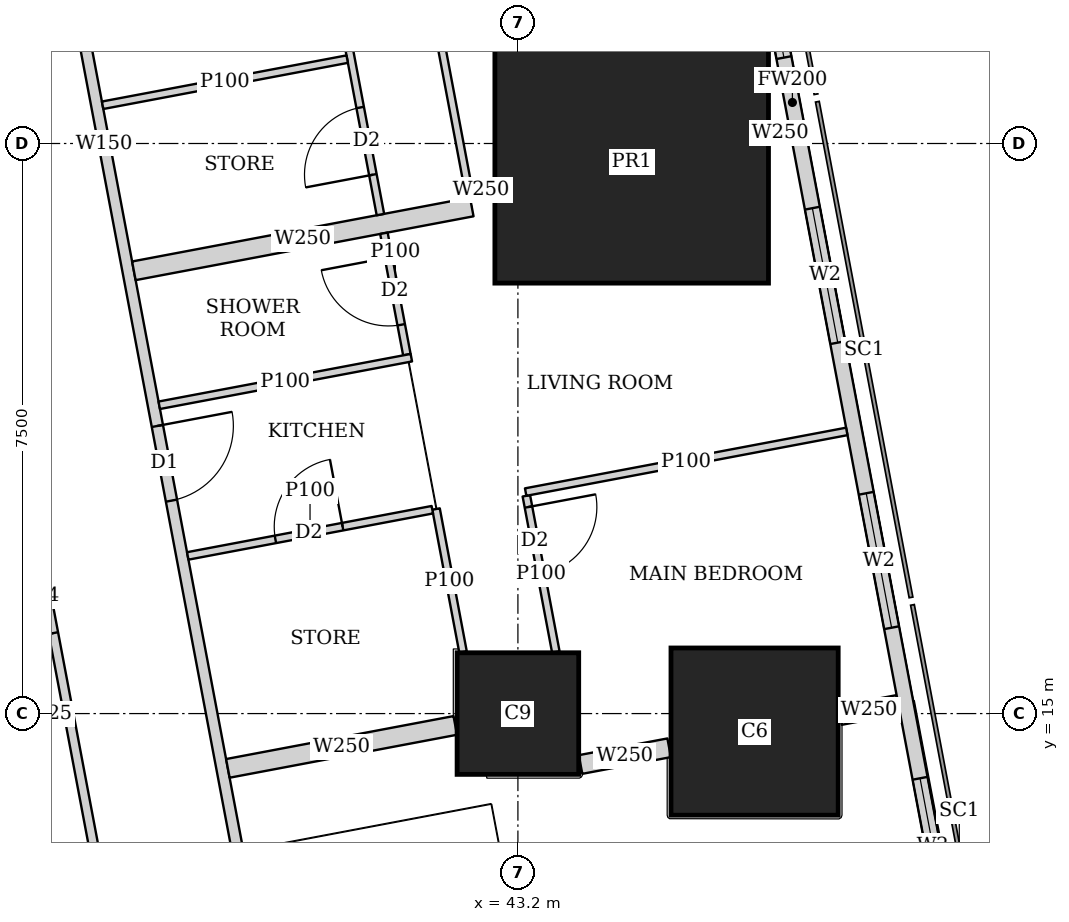
"""IFC4 building model, lengths in metres.
Left out: names, types, materials, properties, quantities, classifications, styles, units other than length and angle.
Written with IfcOpenShell. Run it as: python <this file> out.ifc"""

import sys

from ifc_helpers import new_model, si_unit, direction, frame, frame_2d, origin, origin_2d, place, context, subcontext, project, spatial, rectangle, extrude, element, fill, save


model = new_model("IFC4")
c1 = context("Model", 3, precision=1e-05, world=origin(), true_north=direction((0.0, 1.0)))
c2 = subcontext(c1, "Body", "Model", "MODEL_VIEW")
j1 = project(units=[si_unit("LENGTHUNIT", "METRE"), si_unit("PLANEANGLEUNIT", "RADIAN")], contexts=[c1])
p1 = place(None, origin())
s1 = spatial("IfcSite", under=j1, at=p1, CompositionType="ELEMENT")
p2 = place(p1, origin())
s2 = spatial("IfcBuilding", under=s1, at=p2, CompositionType="ELEMENT")
p3 = place(p2, frame((0.0, 0.0, 100.4)))
s3 = spatial("IfcBuildingStorey", under=s2, at=p3, CompositionType="ELEMENT", Elevation=100.4)
p4 = place(p3, frame((43.2, 15.0, 0.0), z_axis=(0.0, 0.0, 1.0), x_axis=(1.0, 0.0, 0.0)))
e1 = element("IfcColumn", 1, at=p4, inside=s3, PredefinedType="COLUMN", context=c2, shape_type="SweptSolid", body=[
    extrude(rectangle(XDim=1.6, YDim=1.6, at=origin_2d()), origin(), (0.0, 0.0, 1.0), 3.75),
])
p5 = place(p3, frame((46.314, 14.763, 0.0), z_axis=(0.0, 0.0, 1.0), x_axis=(1.0, 0.0, 0.0)))
e2 = element("IfcColumn", 2, at=p5, inside=s3, PredefinedType="COLUMN", context=c2, shape_type="SweptSolid", body=[
    extrude(rectangle(XDim=2.2, YDim=2.2, at=origin_2d()), origin(), (0.0, 0.0, 1.0), 3.75),
])
p6 = place(p3, frame((44.697, 22.263, 0.0), z_axis=(0.0, 0.0, 1.0), x_axis=(1.0, 0.0, 0.0)))
e3 = element("IfcColumn", 3, at=p6, inside=s3, PredefinedType="COLUMN", context=c2, shape_type="SweptSolid", body=[
    extrude(rectangle(XDim=3.6, YDim=3.2, at=origin_2d()), origin(), (0.0, 0.0, 1.0), 3.75),
])
p7 = place(p3, frame((50.653, 2.703, 0.0), z_axis=(0.0, 0.0, 1.0), x_axis=(-0.185612026696, 0.982623109613, 0.0)))
e4 = element("IfcWall", 4, at=p7, inside=s3, PredefinedType="SOLIDWALL", context=c2, shape_type="SweptSolid", body=[
    extrude(rectangle(XDim=41.393, YDim=0.2, at=frame_2d((20.697, 0.0))), origin(), (0.0, 0.0, 1.0), 3.5),
])
p8 = place(p7, frame((1.633, 0.0, 0.9)))
e5 = element("IfcOpeningElement", 5, at=p8, cuts=e4, PredefinedType="OPENING", context=c2, shape_type="SweptSolid", body=[
    extrude(rectangle(XDim=1.8, YDim=1.5, at=frame_2d((0.9, 0.75))), frame((0.0, 0.11, 0.0), z_axis=(0.0, -1.0, 0.0), x_axis=(1.0, 0.0, 0.0)), (0.0, 0.0, 1.0), 0.22),
])
p9 = place(p7, frame((6.032, 0.0, 0.9)))
e6 = element("IfcOpeningElement", 6, at=p9, cuts=e4, PredefinedType="OPENING", context=c2, shape_type="SweptSolid", body=[
    extrude(rectangle(XDim=1.8, YDim=1.5, at=frame_2d((0.9, 0.75))), frame((0.0, 0.11, 0.0), z_axis=(0.0, -1.0, 0.0), x_axis=(1.0, 0.0, 0.0)), (0.0, 0.0, 1.0), 0.22),
])
p10 = place(p7, frame((9.848, 0.0, 0.9)))
e7 = element("IfcOpeningElement", 7, at=p10, cuts=e4, PredefinedType="OPENING", context=c2, shape_type="SweptSolid", body=[
    extrude(rectangle(XDim=1.8, YDim=1.5, at=frame_2d((0.9, 0.75))), frame((0.0, 0.11, 0.0), z_axis=(0.0, -1.0, 0.0), x_axis=(1.0, 0.0, 0.0)), (0.0, 0.0, 1.0), 0.22),
])
p11 = place(p7, frame((13.664, 0.0, 0.9)))
e8 = element("IfcOpeningElement", 8, at=p11, cuts=e4, PredefinedType="OPENING", context=c2, shape_type="SweptSolid", body=[
    extrude(rectangle(XDim=1.8, YDim=1.5, at=frame_2d((0.9, 0.75))), frame((0.0, 0.11, 0.0), z_axis=(0.0, -1.0, 0.0), x_axis=(1.0, 0.0, 0.0)), (0.0, 0.0, 1.0), 0.22),
])
p12 = place(p7, frame((17.481, 0.0, 0.9)))
e9 = element("IfcOpeningElement", 9, at=p12, cuts=e4, PredefinedType="OPENING", context=c2, shape_type="SweptSolid", body=[
    extrude(rectangle(XDim=1.8, YDim=1.5, at=frame_2d((0.9, 0.75))), frame((0.0, 0.11, 0.0), z_axis=(0.0, -1.0, 0.0), x_axis=(1.0, 0.0, 0.0)), (0.0, 0.0, 1.0), 0.22),
])
p13 = place(p7, frame((21.297, 0.0, 0.9)))
e10 = element("IfcOpeningElement", 10, at=p13, cuts=e4, PredefinedType="OPENING", context=c2, shape_type="SweptSolid", body=[
    extrude(rectangle(XDim=1.8, YDim=1.5, at=frame_2d((0.9, 0.75))), frame((0.0, 0.11, 0.0), z_axis=(0.0, -1.0, 0.0), x_axis=(1.0, 0.0, 0.0)), (0.0, 0.0, 1.0), 0.22),
])
p14 = place(p7, frame((25.113, 0.0, 0.9)))
e11 = element("IfcOpeningElement", 11, at=p14, cuts=e4, PredefinedType="OPENING", context=c2, shape_type="SweptSolid", body=[
    extrude(rectangle(XDim=1.8, YDim=1.5, at=frame_2d((0.9, 0.75))), frame((0.0, 0.11, 0.0), z_axis=(0.0, -1.0, 0.0), x_axis=(1.0, 0.0, 0.0)), (0.0, 0.0, 1.0), 0.22),
])
p15 = place(p7, frame((28.93, 0.0, 0.9)))
e12 = element("IfcOpeningElement", 12, at=p15, cuts=e4, PredefinedType="OPENING", context=c2, shape_type="SweptSolid", body=[
    extrude(rectangle(XDim=1.8, YDim=1.5, at=frame_2d((0.9, 0.75))), frame((0.0, 0.11, 0.0), z_axis=(0.0, -1.0, 0.0), x_axis=(1.0, 0.0, 0.0)), (0.0, 0.0, 1.0), 0.22),
])
p16 = place(p7, frame((32.746, 0.0, 0.9)))
e13 = element("IfcOpeningElement", 13, at=p16, cuts=e4, PredefinedType="OPENING", context=c2, shape_type="SweptSolid", body=[
    extrude(rectangle(XDim=1.8, YDim=1.5, at=frame_2d((0.9, 0.75))), frame((0.0, 0.11, 0.0), z_axis=(0.0, -1.0, 0.0), x_axis=(1.0, 0.0, 0.0)), (0.0, 0.0, 1.0), 0.22),
])
p17 = place(p7, frame((36.481, 0.0, 0.9)))
e14 = element("IfcOpeningElement", 14, at=p17, cuts=e4, PredefinedType="OPENING", context=c2, shape_type="SweptSolid", body=[
    extrude(rectangle(XDim=1.8, YDim=1.5, at=frame_2d((0.9, 0.75))), frame((0.0, 0.11, 0.0), z_axis=(0.0, -1.0, 0.0), x_axis=(1.0, 0.0, 0.0)), (0.0, 0.0, 1.0), 0.22),
])
p18 = place(p3, frame((33.382, 45.65, 0.0), z_axis=(0.0, 0.0, 1.0), x_axis=(0.185593544777, -0.982626600565, 0.0)))
e15 = element("IfcWall", 15, at=p18, inside=s3, PredefinedType="SOLIDWALL", context=c2, shape_type="SweptSolid", body=[
    extrude(rectangle(XDim=47.118, YDim=0.15, at=frame_2d((23.559, 0.0))), origin(), (0.0, 0.0, 1.0), 2.2),
])
p19 = place(p18, frame((10.662, 0.0, 0.0)))
e16 = element("IfcOpeningElement", 16, at=p19, cuts=e15, PredefinedType="OPENING", context=c2, shape_type="SweptSolid", body=[
    extrude(rectangle(XDim=1.0, YDim=2.1, at=frame_2d((0.5, 1.05))), frame((0.0, 0.085, 0.0), z_axis=(0.0, -1.0, 0.0), x_axis=(1.0, 0.0, 0.0)), (0.0, 0.0, 1.0), 0.17),
])
p20 = place(p18, frame((15.237, 0.0, 0.0)))
e17 = element("IfcOpeningElement", 17, at=p20, cuts=e15, PredefinedType="OPENING", context=c2, shape_type="SweptSolid", body=[
    extrude(rectangle(XDim=1.0, YDim=2.1, at=frame_2d((0.5, 1.05))), frame((0.0, 0.085, 0.0), z_axis=(0.0, -1.0, 0.0), x_axis=(1.0, 0.0, 0.0)), (0.0, 0.0, 1.0), 0.17),
])
p21 = place(p18, frame((27.341, 0.0, 0.0)))
e18 = element("IfcOpeningElement", 18, at=p21, cuts=e15, PredefinedType="OPENING", context=c2, shape_type="SweptSolid", body=[
    extrude(rectangle(XDim=1.0, YDim=2.1, at=frame_2d((0.5, 1.05))), frame((0.0, 0.085, 0.0), z_axis=(0.0, -1.0, 0.0), x_axis=(1.0, 0.0, 0.0)), (0.0, 0.0, 1.0), 0.17),
])
p22 = place(p18, frame((33.833, 0.0, 0.0)))
e19 = element("IfcOpeningElement", 19, at=p22, cuts=e15, PredefinedType="OPENING", context=c2, shape_type="SweptSolid", body=[
    extrude(rectangle(XDim=1.0, YDim=2.1, at=frame_2d((0.5, 1.05))), frame((0.0, 0.085, 0.0), z_axis=(0.0, -1.0, 0.0), x_axis=(1.0, 0.0, 0.0)), (0.0, 0.0, 1.0), 0.17),
])
p23 = place(p3, frame((41.157, 29.273, 0.0), z_axis=(0.0, 0.0, 1.0), x_axis=(0.18542464283, -0.982658486877, 0.0)))
e20 = element("IfcWall", 20, at=p23, inside=s3, PredefinedType="PARTITIONING", context=c2, shape_type="SweptSolid", body=[
    extrude(rectangle(XDim=7.421, YDim=0.1, at=frame_2d((3.71, 0.0))), origin(), (0.0, 0.0, 1.0), 2.5),
])
p24 = place(p23, frame((0.9, 0.0, 0.0)))
e21 = element("IfcOpeningElement", 21, at=p24, cuts=e20, PredefinedType="OPENING", context=c2, shape_type="SweptSolid", body=[
    extrude(rectangle(XDim=0.9, YDim=2.1, at=frame_2d((0.45, 1.05))), frame((0.0, 0.06, 0.0), z_axis=(0.0, -1.0, 0.0), x_axis=(1.0, 0.0, 0.0)), (0.0, 0.0, 1.0), 0.12),
])
p25 = place(p23, frame((4.126, 0.0, 0.0)))
e22 = element("IfcOpeningElement", 22, at=p25, cuts=e20, PredefinedType="OPENING", context=c2, shape_type="SweptSolid", body=[
    extrude(rectangle(XDim=0.9, YDim=2.1, at=frame_2d((0.45, 1.05))), frame((0.0, 0.06, 0.0), z_axis=(0.0, -1.0, 0.0), x_axis=(1.0, 0.0, 0.0)), (0.0, 0.0, 1.0), 0.12),
])
p26 = place(p3, frame((39.997, 28.942, 0.0), z_axis=(0.0, 0.0, 1.0), x_axis=(0.185686318797, -0.982609073341, 0.0)))
e23 = element("IfcWall", 23, at=p26, inside=s3, PredefinedType="PARTITIONING", context=c2, shape_type="SweptSolid", body=[
    extrude(rectangle(XDim=7.508, YDim=0.1, at=frame_2d((3.754, 0.0))), origin(), (0.0, 0.0, 1.0), 2.5),
])
p27 = place(p26, frame((0.655, 0.0, 0.0)))
e24 = element("IfcOpeningElement", 24, at=p27, cuts=e23, PredefinedType="OPENING", context=c2, shape_type="SweptSolid", body=[
    extrude(rectangle(XDim=0.9, YDim=2.1, at=frame_2d((0.45, 1.05))), frame((0.0, 0.06, 0.0), z_axis=(0.0, -1.0, 0.0), x_axis=(1.0, 0.0, 0.0)), (0.0, 0.0, 1.0), 0.12),
])
p28 = place(p26, frame((4.166, 0.0, 0.0)))
e25 = element("IfcOpeningElement", 25, at=p28, cuts=e23, PredefinedType="OPENING", context=c2, shape_type="SweptSolid", body=[
    extrude(rectangle(XDim=0.9, YDim=2.1, at=frame_2d((0.45, 1.05))), frame((0.0, 0.06, 0.0), z_axis=(0.0, -1.0, 0.0), x_axis=(1.0, 0.0, 0.0)), (0.0, 0.0, 1.0), 0.12),
])
p29 = place(p26, frame((2.563, 0.0, 0.0)))
e26 = element("IfcOpeningElement", 26, at=p29, cuts=e23, PredefinedType="OPENING", context=c2, shape_type="SweptSolid", body=[
    extrude(rectangle(XDim=0.9, YDim=2.1, at=frame_2d((0.45, 1.05))), frame((0.0, 0.06, 0.0), z_axis=(0.0, -1.0, 0.0), x_axis=(1.0, 0.0, 0.0)), (0.0, 0.0, 1.0), 0.12),
])
p30 = place(p26, frame((6.074, 0.0, 0.0)))
e27 = element("IfcOpeningElement", 27, at=p30, cuts=e23, PredefinedType="OPENING", context=c2, shape_type="SweptSolid", body=[
    extrude(rectangle(XDim=0.9, YDim=2.1, at=frame_2d((0.45, 1.05))), frame((0.0, 0.06, 0.0), z_axis=(0.0, -1.0, 0.0), x_axis=(1.0, 0.0, 0.0)), (0.0, 0.0, 1.0), 0.12),
])
p31 = place(p3, frame((40.954, 23.61, 0.0), z_axis=(0.0, 0.0, 1.0), x_axis=(-0.982661397469, -0.185409217473, 0.0)))
e28 = element("IfcWall", 28, at=p31, inside=s3, PredefinedType="PARTITIONING", context=c2, shape_type="SweptSolid", body=[
    extrude(rectangle(XDim=3.275, YDim=0.1, at=frame_2d((1.637, 0.0))), origin(), (0.0, 0.0, 1.0), 2.5),
])
p32 = place(p3, frame((41.437, 21.319, 0.0), z_axis=(0.0, 0.0, 1.0), x_axis=(0.185793689589, -0.982588777113, 0.0)))
e29 = element("IfcWall", 29, at=p32, inside=s3, PredefinedType="PARTITIONING", context=c2, shape_type="SweptSolid", body=[
    extrude(rectangle(XDim=1.625, YDim=0.1, at=frame_2d((0.813, 0.0))), origin(), (0.0, 0.0, 1.0), 3.5),
])
p33 = place(p32, frame((0.325, 0.0, 0.0)))
e30 = element("IfcOpeningElement", 30, at=p33, cuts=e29, PredefinedType="OPENING", context=c2, shape_type="SweptSolid", body=[
    extrude(rectangle(XDim=0.9, YDim=2.1, at=frame_2d((0.45, 1.05))), frame((0.0, 0.06, 0.0), z_axis=(0.0, -1.0, 0.0), x_axis=(1.0, 0.0, 0.0)), (0.0, 0.0, 1.0), 0.12),
])
p34 = place(p3, frame((41.798, 19.682, 0.0), z_axis=(0.0, 0.0, 1.0), x_axis=(-0.982656183703, -0.185436848091, 0.0)))
e31 = element("IfcWall", 31, at=p34, inside=s3, PredefinedType="PARTITIONING", context=c2, shape_type="SweptSolid", body=[
    extrude(rectangle(XDim=3.376, YDim=0.1, at=frame_2d((1.688, 0.0))), origin(), (0.0, 0.0, 1.0), 3.5),
])
p35 = place(p3, frame((43.311, 17.865, 0.0), z_axis=(0.0, 0.0, 1.0), x_axis=(0.185507827929, -0.982642786457, 0.0)))
e32 = element("IfcWall", 32, at=p35, inside=s3, PredefinedType="PARTITIONING", context=c2, shape_type="SweptSolid", body=[
    extrude(rectangle(XDim=2.091, YDim=0.1, at=frame_2d((1.046, 0.0))), origin(), (0.0, 0.0, 1.0), 3.5),
])
p36 = place(p35, frame((0.15, 0.0, 0.0)))
e33 = element("IfcOpeningElement", 33, at=p36, cuts=e32, PredefinedType="OPENING", context=c2, shape_type="SweptSolid", body=[
    extrude(rectangle(XDim=0.9, YDim=2.1, at=frame_2d((0.45, 1.05))), frame((0.0, 0.06, 0.0), z_axis=(0.0, -1.0, 0.0), x_axis=(1.0, 0.0, 0.0)), (0.0, 0.0, 1.0), 0.12),
])
p37 = place(p3, frame((42.123, 17.691, 0.0), z_axis=(0.0, 0.0, 1.0), x_axis=(0.185458984533, -0.982652006081, 0.0)))
e34 = element("IfcWall", 34, at=p37, inside=s3, PredefinedType="PARTITIONING", context=c2, shape_type="SweptSolid", body=[
    extrude(rectangle(XDim=1.914, YDim=0.1, at=frame_2d((0.957, 0.0))), origin(), (0.0, 0.0, 1.0), 3.5),
])
p38 = place(p3, frame((47.527, 18.712, 0.0), z_axis=(0.0, 0.0, 1.0), x_axis=(-0.982633535512, -0.185556823879, 0.0)))
e35 = element("IfcWall", 35, at=p38, inside=s3, PredefinedType="PARTITIONING", context=c2, shape_type="SweptSolid", body=[
    extrude(rectangle(XDim=4.3, YDim=0.1, at=frame_2d((2.15, 0.0))), origin(), (0.0, 0.0, 1.0), 2.2),
])
p39 = place(p3, frame((42.074, 17.682, 0.0), z_axis=(0.0, 0.0, 1.0), x_axis=(-0.982620626894, -0.185625169636, 0.0)))
e36 = element("IfcWall", 36, at=p39, inside=s3, PredefinedType="PARTITIONING", context=c2, shape_type="SweptSolid", body=[
    extrude(rectangle(XDim=3.275, YDim=0.1, at=frame_2d((1.637, 0.0))), origin(), (0.0, 0.0, 1.0), 3.5),
])
p40 = place(p39, frame((1.201, 0.0, 0.0)))
e37 = element("IfcOpeningElement", 37, at=p40, cuts=e36, PredefinedType="OPENING", context=c2, shape_type="SweptSolid", body=[
    extrude(rectangle(XDim=0.9, YDim=2.1, at=frame_2d((0.45, 1.05))), frame((0.0, 0.06, 0.0), z_axis=(0.0, -1.0, 0.0), x_axis=(1.0, 0.0, 0.0)), (0.0, 0.0, 1.0), 0.12),
])
p41 = place(p3, frame((46.782, 22.657, 0.0), z_axis=(0.0, 0.0, 1.0), x_axis=(-0.982104607121, -0.188336243648, 0.0)))
e38 = element("IfcWall", 38, at=p41, inside=s3, PredefinedType="SOLIDWALL", context=c2, shape_type="SweptSolid", body=[
    extrude(rectangle(XDim=0.266, YDim=0.25, at=frame_2d((0.133, 0.0))), origin(), (0.0, 0.0, 1.0), 3.5),
])
p42 = place(p3, frame((42.873, 21.918, 0.0), z_axis=(0.0, 0.0, 1.0), x_axis=(-0.982431406936, -0.186624035603, 0.0)))
e39 = element("IfcWall", 39, at=p42, inside=s3, PredefinedType="SOLIDWALL", context=c2, shape_type="SweptSolid", body=[
    extrude(rectangle(XDim=0.322, YDim=0.25, at=frame_2d((0.161, 0.0))), origin(), (0.0, 0.0, 1.0), 2.5),
])
p43 = place(p3, frame((42.593, 21.665, 0.0), z_axis=(0.0, 0.0, 1.0), x_axis=(-0.982612837616, -0.185666398014, 0.0)))
e40 = element("IfcWall", 40, at=p43, inside=s3, PredefinedType="SOLIDWALL", context=c2, shape_type="SweptSolid", body=[
    extrude(rectangle(XDim=4.525, YDim=0.25, at=frame_2d((2.262, 0.0))), origin(), (0.0, 0.0, 1.0), 2.5),
])
p44 = place(p3, frame((48.206, 15.12, 0.0), z_axis=(0.0, 0.0, 1.0), x_axis=(-0.982638023929, -0.185533053469, 0.0)))
e41 = element("IfcWall", 41, at=p44, inside=s3, PredefinedType="SOLIDWALL", context=c2, shape_type="SweptSolid", body=[
    extrude(rectangle(XDim=0.782, YDim=0.25, at=frame_2d((0.391, 0.0))), origin(), (0.0, 0.0, 1.0), 3.5),
])
p45 = place(p3, frame((45.19, 14.55, 0.0), z_axis=(0.0, 0.0, 1.0), x_axis=(-0.982666604435, -0.185381618634, 0.0)))
e42 = element("IfcWall", 42, at=p45, inside=s3, PredefinedType="SOLIDWALL", context=c2, shape_type="SweptSolid", body=[
    extrude(rectangle(XDim=1.187, YDim=0.25, at=frame_2d((0.593, 0.0))), origin(), (0.0, 0.0, 1.0), 3.5),
])
p46 = place(p3, frame((42.376, 14.844, 0.0), z_axis=(0.0, 0.0, 1.0), x_axis=(-0.982636286056, -0.185542257522, 0.0)))
e43 = element("IfcWall", 43, at=p46, inside=s3, PredefinedType="SOLIDWALL", context=c2, shape_type="SweptSolid", body=[
    extrude(rectangle(XDim=3.045, YDim=0.25, at=frame_2d((1.522, 0.0))), origin(), (0.0, 0.0, 1.0), 3.5),
])
p47 = place(p3, frame((38.202, 10.163, 0.0), z_axis=(0.0, 0.0, 1.0), x_axis=(-0.185610321132, 0.982623431783, 0.0)))
e44 = element("IfcWall", 44, at=p47, inside=s3, PredefinedType="PARTITIONING", context=c2, shape_type="SweptSolid", body=[
    extrude(rectangle(XDim=25.111, YDim=0.125, at=frame_2d((12.556, 0.0))), origin(), (0.0, 0.0, 1.0), 2.5),
])
p48 = place(p47, frame((0.708, 0.0, 0.0)))
e45 = element("IfcOpeningElement", 45, at=p48, cuts=e44, PredefinedType="OPENING", context=c2, shape_type="SweptSolid", body=[
    extrude(rectangle(XDim=1.0, YDim=2.1, at=frame_2d((0.5, 1.05))), frame((0.0, 0.073, 0.0), z_axis=(0.0, -1.0, 0.0), x_axis=(1.0, 0.0, 0.0)), (0.0, 0.0, 1.0), 0.145),
])
p49 = place(p47, frame((6.0, 0.0, 0.0)))
e46 = element("IfcOpeningElement", 46, at=p49, cuts=e44, PredefinedType="OPENING", context=c2, shape_type="SweptSolid", body=[
    extrude(rectangle(XDim=1.0, YDim=2.1, at=frame_2d((0.5, 1.05))), frame((0.0, 0.073, 0.0), z_axis=(0.0, -1.0, 0.0), x_axis=(1.0, 0.0, 0.0)), (0.0, 0.0, 1.0), 0.145),
])
p50 = place(p47, frame((13.378, 0.0, 0.0)))
e47 = element("IfcOpeningElement", 47, at=p50, cuts=e44, PredefinedType="OPENING", context=c2, shape_type="SweptSolid", body=[
    extrude(rectangle(XDim=1.0, YDim=2.1, at=frame_2d((0.5, 1.05))), frame((0.0, 0.073, 0.0), z_axis=(0.0, -1.0, 0.0), x_axis=(1.0, 0.0, 0.0)), (0.0, 0.0, 1.0), 0.145),
])
p51 = place(p47, frame((21.25, 0.0, 0.0)))
e48 = element("IfcOpeningElement", 48, at=p51, cuts=e44, PredefinedType="OPENING", context=c2, shape_type="SweptSolid", body=[
    extrude(rectangle(XDim=1.0, YDim=2.1, at=frame_2d((0.5, 1.05))), frame((0.0, 0.073, 0.0), z_axis=(0.0, -1.0, 0.0), x_axis=(1.0, 0.0, 0.0)), (0.0, 0.0, 1.0), 0.145),
])
p52 = place(p3, frame((36.801, 15.0, 0.0), z_axis=(0.0, 0.0, 1.0), x_axis=(1.0, 0.0, 0.0)))
e49 = element("IfcWall", 49, at=p52, inside=s3, PredefinedType="PARTITIONING", context=c2, shape_type="SweptSolid", body=[
    extrude(rectangle(XDim=0.412, YDim=0.125, at=frame_2d((0.206, 0.0))), origin(), (0.0, 0.0, 1.0), 3.5),
])
p53 = place(p10, origin())
e50 = element("IfcWindow", 50, at=p53, inside=s3, PartitioningType="SINGLE_PANEL", PredefinedType="WINDOW", context=c2, shape_type="SweptSolid", body=[
    extrude(rectangle(XDim=1.8, YDim=1.5, at=frame_2d((0.9, 0.75))), frame((0.0, 0.03, 0.0), z_axis=(0.0, -1.0, 0.0), x_axis=(1.0, 0.0, 0.0)), (0.0, 0.0, 1.0), 0.06),
])
fill(e7, e50)
p54 = place(p11, origin())
e51 = element("IfcWindow", 51, at=p54, inside=s3, PartitioningType="SINGLE_PANEL", PredefinedType="WINDOW", context=c2, shape_type="SweptSolid", body=[
    extrude(rectangle(XDim=1.8, YDim=1.5, at=frame_2d((0.9, 0.75))), frame((0.0, 0.03, 0.0), z_axis=(0.0, -1.0, 0.0), x_axis=(1.0, 0.0, 0.0)), (0.0, 0.0, 1.0), 0.06),
])
fill(e8, e51)
p55 = place(p12, origin())
e52 = element("IfcWindow", 52, at=p55, inside=s3, PartitioningType="SINGLE_PANEL", PredefinedType="WINDOW", context=c2, shape_type="SweptSolid", body=[
    extrude(rectangle(XDim=1.8, YDim=1.5, at=frame_2d((0.9, 0.75))), frame((0.0, 0.03, 0.0), z_axis=(0.0, -1.0, 0.0), x_axis=(1.0, 0.0, 0.0)), (0.0, 0.0, 1.0), 0.06),
])
fill(e9, e52)
p56 = place(p13, origin())
e53 = element("IfcWindow", 53, at=p56, inside=s3, PartitioningType="SINGLE_PANEL", PredefinedType="WINDOW", context=c2, shape_type="SweptSolid", body=[
    extrude(rectangle(XDim=1.8, YDim=1.5, at=frame_2d((0.9, 0.75))), frame((0.0, 0.03, 0.0), z_axis=(0.0, -1.0, 0.0), x_axis=(1.0, 0.0, 0.0)), (0.0, 0.0, 1.0), 0.06),
])
fill(e10, e53)
p57 = place(p30, origin())
e54 = element("IfcDoor", 54, at=p57, inside=s3, OperationType="SINGLE_SWING_LEFT", PredefinedType="DOOR", context=c2, shape_type="SweptSolid", body=[
    extrude(rectangle(XDim=0.9, YDim=2.1, at=frame_2d((0.45, 1.05))), frame((0.0, 0.025, 0.0), z_axis=(0.0, -1.0, 0.0), x_axis=(1.0, 0.0, 0.0)), (0.0, 0.0, 1.0), 0.05),
])
fill(e27, e54)
p58 = place(p33, origin())
e55 = element("IfcDoor", 55, at=p58, inside=s3, OperationType="SINGLE_SWING_RIGHT", PredefinedType="DOOR", context=c2, shape_type="SweptSolid", body=[
    extrude(rectangle(XDim=0.9, YDim=2.1, at=frame_2d((0.45, 1.05))), frame((0.0, 0.025, 0.0), z_axis=(0.0, -1.0, 0.0), x_axis=(1.0, 0.0, 0.0)), (0.0, 0.0, 1.0), 0.05),
])
fill(e30, e55)
p59 = place(p36, origin())
e56 = element("IfcDoor", 56, at=p59, inside=s3, OperationType="SINGLE_SWING_LEFT", PredefinedType="DOOR", context=c2, shape_type="SweptSolid", body=[
    extrude(rectangle(XDim=0.9, YDim=2.1, at=frame_2d((0.45, 1.05))), frame((0.0, 0.025, 0.0), z_axis=(0.0, -1.0, 0.0), x_axis=(1.0, 0.0, 0.0)), (0.0, 0.0, 1.0), 0.05),
])
fill(e33, e56)
p60 = place(p21, origin())
e57 = element("IfcDoor", 57, at=p60, inside=s3, OperationType="SINGLE_SWING_LEFT", PredefinedType="DOOR", context=c2, shape_type="SweptSolid", body=[
    extrude(rectangle(XDim=1.0, YDim=2.1, at=frame_2d((0.5, 1.05))), frame((0.0, 0.025, 0.0), z_axis=(0.0, -1.0, 0.0), x_axis=(1.0, 0.0, 0.0)), (0.0, 0.0, 1.0), 0.05),
])
fill(e18, e57)
p61 = place(p40, origin())
e58 = element("IfcDoor", 58, at=p61, inside=s3, OperationType="SINGLE_SWING_RIGHT", PredefinedType="DOOR", context=c2, shape_type="SweptSolid", body=[
    extrude(rectangle(XDim=0.9, YDim=2.1, at=frame_2d((0.45, 1.05))), frame((0.0, 0.025, 0.0), z_axis=(0.0, -1.0, 0.0), x_axis=(1.0, 0.0, 0.0)), (0.0, 0.0, 1.0), 0.05),
])
fill(e37, e58)
p62 = place(p49, origin())
e59 = element("IfcDoor", 59, at=p62, inside=s3, OperationType="SINGLE_SWING_LEFT", PredefinedType="DOOR", context=c2, shape_type="SweptSolid", body=[
    extrude(rectangle(XDim=1.0, YDim=2.1, at=frame_2d((0.5, 1.05))), frame((0.0, 0.025, 0.0), z_axis=(0.0, -1.0, 0.0), x_axis=(1.0, 0.0, 0.0)), (0.0, 0.0, 1.0), 0.05),
])
fill(e46, e59)
save(model, sys.argv[1])
